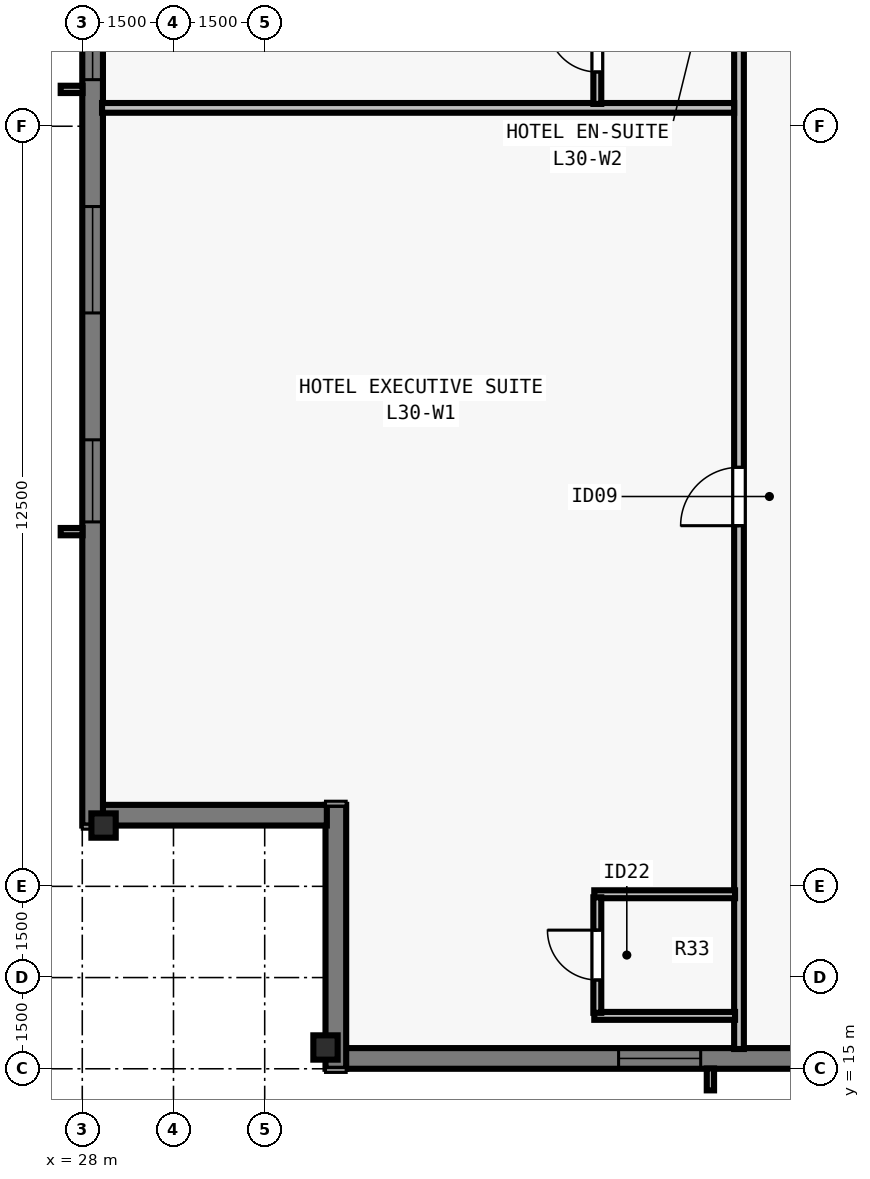
"""IFC4 building model, lengths in metres.
Left out: names, types, materials, properties, quantities, classifications, styles, units other than length and angle.
Written with IfcOpenShell. Run it as: python <this file> out.ifc"""

import sys

from ifc_helpers import new_model, si_unit, direction, frame, frame_2d, origin, origin_2d, place, context, subcontext, project, spatial, rectangle, i_section, extrude, element, fill, save


model = new_model("IFC4")
c1 = context("Model", 3, precision=1e-05, world=origin(), true_north=direction((0.0, 1.0)))
c2 = subcontext(c1, "Body", "Model", "MODEL_VIEW")
j1 = project(units=[si_unit("LENGTHUNIT", "METRE"), si_unit("PLANEANGLEUNIT", "RADIAN")], contexts=[c1])
p1 = place(None, origin())
s1 = spatial("IfcSite", under=j1, at=p1, CompositionType="ELEMENT")
p2 = place(p1, origin())
s2 = spatial("IfcBuilding", under=s1, at=p2, CompositionType="ELEMENT")
p3 = place(p2, frame((0.0, 0.0, 113.0)))
s3 = spatial("IfcBuildingStorey", under=s2, at=p3, CompositionType="ELEMENT", Elevation=113.0)
for number, where, z_axis, x_axis in (
    (1, (32.0, 15.35, 0.0), (0.0, 0.0, 1.0), (1.0, 0.0, 0.0)),
    (2, (28.35, 19.0, 0.0), (0.0, 0.0, 1.0), (0.0, 1.0, 0.0)),
):
    element("IfcColumn", number, at=place(p3, frame(where, z_axis=z_axis, x_axis=x_axis)), inside=s3, PredefinedType="COLUMN", context=c2, shape_type="SweptSolid", body=[
        extrude(i_section(OverallWidth=0.4, OverallDepth=0.4, WebThickness=0.022, FlangeThickness=0.036, at=origin_2d()), origin(), (0.0, 0.0, 1.0), 3.5),
    ])
p4 = place(p3, frame((72.0, 15.17, 0.0), z_axis=(0.0, 0.0, 1.0), x_axis=(-1.0, 0.0, 0.0)))
e3 = element("IfcWall", 3, at=p4, inside=s3, PredefinedType="SOLIDWALL", context=c2, shape_type="SweptSolid", body=[
    extrude(rectangle(XDim=39.682, YDim=0.34, at=frame_2d((19.841, 0.0))), origin(), (0.0, 0.0, 1.0), 3.28),
])
p5 = place(p4, frame((4.952, 0.0, 0.8)))
e4 = element("IfcOpeningElement", 4, at=p5, cuts=e3, PredefinedType="OPENING", context=c2, shape_type="SweptSolid", body=[
    extrude(rectangle(XDim=1.35, YDim=1.66, at=frame_2d((0.675, 0.83))), frame((0.0, 0.18, 0.0), z_axis=(0.0, -1.0, 0.0), x_axis=(1.0, 0.0, 0.0)), (0.0, 0.0, 1.0), 0.36),
])
p6 = place(p4, frame((9.555, 0.0, 0.8)))
e5 = element("IfcOpeningElement", 5, at=p6, cuts=e3, PredefinedType="OPENING", context=c2, shape_type="SweptSolid", body=[
    extrude(rectangle(XDim=1.75, YDim=1.66, at=frame_2d((0.875, 0.83))), frame((0.0, 0.18, 0.0), z_axis=(0.0, -1.0, 0.0), x_axis=(1.0, 0.0, 0.0)), (0.0, 0.0, 1.0), 0.36),
])
p7 = place(p4, frame((12.059, 0.0, 0.8)))
e6 = element("IfcOpeningElement", 6, at=p7, cuts=e3, PredefinedType="OPENING", context=c2, shape_type="SweptSolid", body=[
    extrude(rectangle(XDim=1.35, YDim=1.66, at=frame_2d((0.675, 0.83))), frame((0.0, 0.18, 0.0), z_axis=(0.0, -1.0, 0.0), x_axis=(1.0, 0.0, 0.0)), (0.0, 0.0, 1.0), 0.36),
])
p8 = place(p4, frame((16.262, 0.0, 0.8)))
e7 = element("IfcOpeningElement", 7, at=p8, cuts=e3, PredefinedType="OPENING", context=c2, shape_type="SweptSolid", body=[
    extrude(rectangle(XDim=1.75, YDim=1.66, at=frame_2d((0.875, 0.83))), frame((0.0, 0.18, 0.0), z_axis=(0.0, -1.0, 0.0), x_axis=(1.0, 0.0, 0.0)), (0.0, 0.0, 1.0), 0.36),
])
p9 = place(p4, frame((18.716, 0.0, 0.8)))
e8 = element("IfcOpeningElement", 8, at=p9, cuts=e3, PredefinedType="OPENING", context=c2, shape_type="SweptSolid", body=[
    extrude(rectangle(XDim=1.35, YDim=1.66, at=frame_2d((0.675, 0.83))), frame((0.0, 0.18, 0.0), z_axis=(0.0, -1.0, 0.0), x_axis=(1.0, 0.0, 0.0)), (0.0, 0.0, 1.0), 0.36),
])
p10 = place(p4, frame((22.07, 0.0, 0.8)))
e9 = element("IfcOpeningElement", 9, at=p10, cuts=e3, PredefinedType="OPENING", context=c2, shape_type="SweptSolid", body=[
    extrude(rectangle(XDim=1.75, YDim=1.66, at=frame_2d((0.875, 0.83))), frame((0.0, 0.18, 0.0), z_axis=(0.0, -1.0, 0.0), x_axis=(1.0, 0.0, 0.0)), (0.0, 0.0, 1.0), 0.36),
])
p11 = place(p4, frame((26.273, 0.0, 0.8)))
e10 = element("IfcOpeningElement", 10, at=p11, cuts=e3, PredefinedType="OPENING", context=c2, shape_type="SweptSolid", body=[
    extrude(rectangle(XDim=1.35, YDim=1.66, at=frame_2d((0.675, 0.83))), frame((0.0, 0.18, 0.0), z_axis=(0.0, -1.0, 0.0), x_axis=(1.0, 0.0, 0.0)), (0.0, 0.0, 1.0), 0.36),
])
p12 = place(p4, frame((28.777, 0.0, 0.8)))
e11 = element("IfcOpeningElement", 11, at=p12, cuts=e3, PredefinedType="OPENING", context=c2, shape_type="SweptSolid", body=[
    extrude(rectangle(XDim=1.75, YDim=1.66, at=frame_2d((0.875, 0.83))), frame((0.0, 0.18, 0.0), z_axis=(0.0, -1.0, 0.0), x_axis=(1.0, 0.0, 0.0)), (0.0, 0.0, 1.0), 0.36),
])
p13 = place(p4, frame((33.83, 0.0, 0.8)))
e12 = element("IfcOpeningElement", 12, at=p13, cuts=e3, PredefinedType="OPENING", context=c2, shape_type="SweptSolid", body=[
    extrude(rectangle(XDim=1.35, YDim=1.66, at=frame_2d((0.675, 0.83))), frame((0.0, 0.18, 0.0), z_axis=(0.0, -1.0, 0.0), x_axis=(1.0, 0.0, 0.0)), (0.0, 0.0, 1.0), 0.36),
])
p14 = place(p3, frame((32.17, 15.0, 0.0), z_axis=(0.0, 0.0, 1.0), x_axis=(0.0, 1.0, 0.0)))
e13 = element("IfcWall", 13, at=p14, inside=s3, PredefinedType="SOLIDWALL", context=c2, shape_type="SweptSolid", body=[
    extrude(rectangle(XDim=4.34, YDim=0.34, at=frame_2d((2.17, 0.0))), origin(), (0.0, 0.0, 1.0), 3.28),
])
p15 = place(p3, frame((32.022, 19.17, 0.0), z_axis=(0.0, 0.0, 1.0), x_axis=(-1.0, 0.0, 0.0)))
e14 = element("IfcWall", 14, at=p15, inside=s3, PredefinedType="SOLIDWALL", context=c2, shape_type="SweptSolid", body=[
    extrude(rectangle(XDim=3.704, YDim=0.34, at=frame_2d((1.852, 0.0))), origin(), (0.0, 0.0, 1.0), 3.28),
])
p16 = place(p3, frame((28.17, 19.0, 0.0), z_axis=(0.0, 0.0, 1.0), x_axis=(0.0, 1.0, 0.0)))
e15 = element("IfcWall", 15, at=p16, inside=s3, PredefinedType="SOLIDWALL", context=c2, shape_type="SweptSolid", body=[
    extrude(rectangle(XDim=25.882, YDim=0.34, at=frame_2d((12.941, 0.0))), origin(), (0.0, 0.0, 1.0), 3.28),
])
p17 = place(p16, frame((4.993, 0.0, 0.8)))
e16 = element("IfcOpeningElement", 16, at=p17, cuts=e15, PredefinedType="OPENING", context=c2, shape_type="SweptSolid", body=[
    extrude(rectangle(XDim=1.35, YDim=1.66, at=frame_2d((0.675, 0.83))), frame((0.0, 0.18, 0.0), z_axis=(0.0, -1.0, 0.0), x_axis=(1.0, 0.0, 0.0)), (0.0, 0.0, 1.0), 0.36),
])
p18 = place(p16, frame((8.43, 0.0, 0.8)))
e17 = element("IfcOpeningElement", 17, at=p18, cuts=e15, PredefinedType="OPENING", context=c2, shape_type="SweptSolid", body=[
    extrude(rectangle(XDim=1.75, YDim=1.66, at=frame_2d((0.875, 0.83))), frame((0.0, 0.18, 0.0), z_axis=(0.0, -1.0, 0.0), x_axis=(1.0, 0.0, 0.0)), (0.0, 0.0, 1.0), 0.36),
])
p19 = place(p16, frame((12.266, 0.0, 0.8)))
e18 = element("IfcOpeningElement", 18, at=p19, cuts=e15, PredefinedType="OPENING", context=c2, shape_type="SweptSolid", body=[
    extrude(rectangle(XDim=1.35, YDim=1.66, at=frame_2d((0.675, 0.83))), frame((0.0, 0.18, 0.0), z_axis=(0.0, -1.0, 0.0), x_axis=(1.0, 0.0, 0.0)), (0.0, 0.0, 1.0), 0.36),
])
p20 = place(p16, frame((16.152, 0.0, 0.8)))
e19 = element("IfcOpeningElement", 19, at=p20, cuts=e15, PredefinedType="OPENING", context=c2, shape_type="SweptSolid", body=[
    extrude(rectangle(XDim=1.75, YDim=1.66, at=frame_2d((0.875, 0.83))), frame((0.0, 0.18, 0.0), z_axis=(0.0, -1.0, 0.0), x_axis=(1.0, 0.0, 0.0)), (0.0, 0.0, 1.0), 0.36),
])
p21 = place(p16, frame((19.539, 0.0, 0.8)))
e20 = element("IfcOpeningElement", 20, at=p21, cuts=e15, PredefinedType="OPENING", context=c2, shape_type="SweptSolid", body=[
    extrude(rectangle(XDim=1.35, YDim=1.66, at=frame_2d((0.675, 0.83))), frame((0.0, 0.18, 0.0), z_axis=(0.0, -1.0, 0.0), x_axis=(1.0, 0.0, 0.0)), (0.0, 0.0, 1.0), 0.36),
])
p22 = place(p3, frame((38.8, 15.325, 0.0), z_axis=(0.0, 0.0, 1.0), x_axis=(0.0, 1.0, 0.0)))
e21 = element("IfcWall", 21, at=p22, inside=s3, PredefinedType="PARTITIONING", context=c2, shape_type="SweptSolid", body=[
    extrude(rectangle(XDim=47.35, YDim=0.16, at=frame_2d((23.675, 0.0))), origin(), (0.0, 0.0, 1.0), 2.555),
])
p23 = place(p22, frame((8.606, 0.0, 0.0)))
e22 = element("IfcOpeningElement", 22, at=p23, cuts=e21, PredefinedType="OPENING", context=c2, shape_type="SweptSolid", body=[
    extrude(rectangle(XDim=0.96, YDim=2.15, at=frame_2d((0.48, 1.075))), frame((0.0, 0.09, 0.0), z_axis=(0.0, -1.0, 0.0), x_axis=(1.0, 0.0, 0.0)), (0.0, 0.0, 1.0), 0.18),
])
p24 = place(p22, frame((24.218, 0.0, 0.0)))
e23 = element("IfcOpeningElement", 23, at=p24, cuts=e21, PredefinedType="OPENING", context=c2, shape_type="SweptSolid", body=[
    extrude(rectangle(XDim=0.96, YDim=2.15, at=frame_2d((0.48, 1.075))), frame((0.0, 0.09, 0.0), z_axis=(0.0, -1.0, 0.0), x_axis=(1.0, 0.0, 0.0)), (0.0, 0.0, 1.0), 0.18),
])
p25 = place(p22, frame((40.107, 0.0, 0.0)))
e24 = element("IfcOpeningElement", 24, at=p25, cuts=e21, PredefinedType="OPENING", context=c2, shape_type="SweptSolid", body=[
    extrude(rectangle(XDim=0.96, YDim=2.15, at=frame_2d((0.48, 1.075))), frame((0.0, 0.09, 0.0), z_axis=(0.0, -1.0, 0.0), x_axis=(1.0, 0.0, 0.0)), (0.0, 0.0, 1.0), 0.18),
])
for number, where, z_axis, x_axis in (
    (25, (36.42, 15.87, 0.0), (0.0, 0.0, 1.0), (1.0, 0.0, 0.0)),
    (26, (36.42, 17.87, 0.0), (0.0, 0.0, 1.0), (1.0, 0.0, 0.0)),
):
    element("IfcWall", number, at=place(p3, frame(where, z_axis=z_axis, x_axis=x_axis)), inside=s3, PredefinedType="PLUMBINGWALL", context=c2, shape_type="SweptSolid", body=[
        extrude(rectangle(XDim=2.315, YDim=0.13, at=frame_2d((1.158, 0.0))), origin(), (0.0, 0.0, 1.0), 3.28),
    ])
p26 = place(p3, frame((36.47, 15.92, 0.0), z_axis=(0.0, 0.0, 1.0), x_axis=(0.0, 1.0, 0.0)))
e27 = element("IfcWall", 27, at=p26, inside=s3, PredefinedType="PLUMBINGWALL", context=c2, shape_type="SweptSolid", body=[
    extrude(rectangle(XDim=1.9, YDim=0.13, at=frame_2d((0.95, 0.0))), origin(), (0.0, 0.0, 1.0), 3.28),
])
p27 = place(p26, frame((0.54, 0.0, 0.0)))
e28 = element("IfcOpeningElement", 28, at=p27, cuts=e27, PredefinedType="OPENING", context=c2, shape_type="SweptSolid", body=[
    extrude(rectangle(XDim=0.82, YDim=2.1, at=frame_2d((0.41, 1.05))), frame((0.0, 0.075, 0.0), z_axis=(0.0, -1.0, 0.0), x_axis=(1.0, 0.0, 0.0)), (0.0, 0.0, 1.0), 0.15),
])
p28 = place(p3, frame((28.325, 30.802, 0.0), z_axis=(0.0, 0.0, 1.0), x_axis=(1.0, 0.0, 0.0)))
e29 = element("IfcWall", 29, at=p28, inside=s3, PredefinedType="PARTITIONING", context=c2, shape_type="SweptSolid", body=[
    extrude(rectangle(XDim=10.395, YDim=0.16, at=frame_2d((5.198, 0.0))), origin(), (0.0, 0.0, 1.0), 3.28),
])
p29 = place(p3, frame((36.47, 30.867, 0.0), z_axis=(0.0, 0.0, 1.0), x_axis=(0.0, 1.0, 0.0)))
e30 = element("IfcWall", 30, at=p29, inside=s3, PredefinedType="PLUMBINGWALL", context=c2, shape_type="SweptSolid", body=[
    extrude(rectangle(XDim=1.885, YDim=0.13, at=frame_2d((0.942, 0.0))), origin(), (0.0, 0.0, 1.0), 3.28),
])
p30 = place(p29, frame((0.525, 0.0, 0.0)))
e31 = element("IfcOpeningElement", 31, at=p30, cuts=e30, PredefinedType="OPENING", context=c2, shape_type="SweptSolid", body=[
    extrude(rectangle(XDim=0.82, YDim=2.1, at=frame_2d((0.41, 1.05))), frame((0.0, 0.075, 0.0), z_axis=(0.0, -1.0, 0.0), x_axis=(1.0, 0.0, 0.0)), (0.0, 0.0, 1.0), 0.15),
])
p31 = place(p13, origin())
e32 = element("IfcWindow", 32, at=p31, inside=s3, PartitioningType="SINGLE_PANEL", PredefinedType="WINDOW", context=c2, shape_type="SweptSolid", body=[
    extrude(rectangle(XDim=1.35, YDim=1.66, at=frame_2d((0.675, 0.83))), frame((0.0, -0.05, 0.0), z_axis=(0.0, -1.0, 0.0), x_axis=(1.0, 0.0, 0.0)), (0.0, 0.0, 1.0), 0.06),
])
fill(e12, e32)
p32 = place(p17, origin())
e33 = element("IfcWindow", 33, at=p32, inside=s3, PartitioningType="SINGLE_PANEL", PredefinedType="WINDOW", context=c2, shape_type="SweptSolid", body=[
    extrude(rectangle(XDim=1.35, YDim=1.66, at=frame_2d((0.675, 0.83))), frame((0.0, -0.05, 0.0), z_axis=(0.0, -1.0, 0.0), x_axis=(1.0, 0.0, 0.0)), (0.0, 0.0, 1.0), 0.06),
])
fill(e16, e33)
p33 = place(p18, origin())
e34 = element("IfcWindow", 34, at=p33, inside=s3, PartitioningType="SINGLE_PANEL", PredefinedType="WINDOW", context=c2, shape_type="SweptSolid", body=[
    extrude(rectangle(XDim=1.75, YDim=1.66, at=frame_2d((0.875, 0.83))), frame((0.0, -0.05, 0.0), z_axis=(0.0, -1.0, 0.0), x_axis=(1.0, 0.0, 0.0)), (0.0, 0.0, 1.0), 0.06),
])
fill(e17, e34)
p34 = place(p19, origin())
e35 = element("IfcWindow", 35, at=p34, inside=s3, PartitioningType="SINGLE_PANEL", PredefinedType="WINDOW", context=c2, shape_type="SweptSolid", body=[
    extrude(rectangle(XDim=1.35, YDim=1.66, at=frame_2d((0.675, 0.83))), frame((0.0, -0.05, 0.0), z_axis=(0.0, -1.0, 0.0), x_axis=(1.0, 0.0, 0.0)), (0.0, 0.0, 1.0), 0.06),
])
fill(e18, e35)
p35 = place(p27, origin())
e36 = element("IfcDoor", 36, at=p35, inside=s3, OperationType="SINGLE_SWING_RIGHT", PredefinedType="DOOR", context=c2, shape_type="SweptSolid", body=[
    extrude(rectangle(XDim=0.82, YDim=2.1, at=frame_2d((0.41, 1.05))), frame((0.0, 0.025, 0.0), z_axis=(0.0, -1.0, 0.0), x_axis=(1.0, 0.0, 0.0)), (0.0, 0.0, 1.0), 0.05),
])
fill(e28, e36)
p36 = place(p23, origin())
e37 = element("IfcDoor", 37, at=p36, inside=s3, OperationType="SINGLE_SWING_LEFT", PredefinedType="DOOR", context=c2, shape_type="SweptSolid", body=[
    extrude(rectangle(XDim=0.96, YDim=2.15, at=frame_2d((0.48, 1.075))), frame((0.0, 0.025, 0.0), z_axis=(0.0, -1.0, 0.0), x_axis=(1.0, 0.0, 0.0)), (0.0, 0.0, 1.0), 0.05),
])
fill(e22, e37)
p37 = place(p30, origin())
e38 = element("IfcDoor", 38, at=p37, inside=s3, OperationType="SINGLE_SWING_RIGHT", PredefinedType="DOOR", context=c2, shape_type="SweptSolid", body=[
    extrude(rectangle(XDim=0.82, YDim=2.1, at=frame_2d((0.41, 1.05))), frame((0.0, 0.025, 0.0), z_axis=(0.0, -1.0, 0.0), x_axis=(1.0, 0.0, 0.0)), (0.0, 0.0, 1.0), 0.05),
])
fill(e31, e38)
save(model, sys.argv[1])
